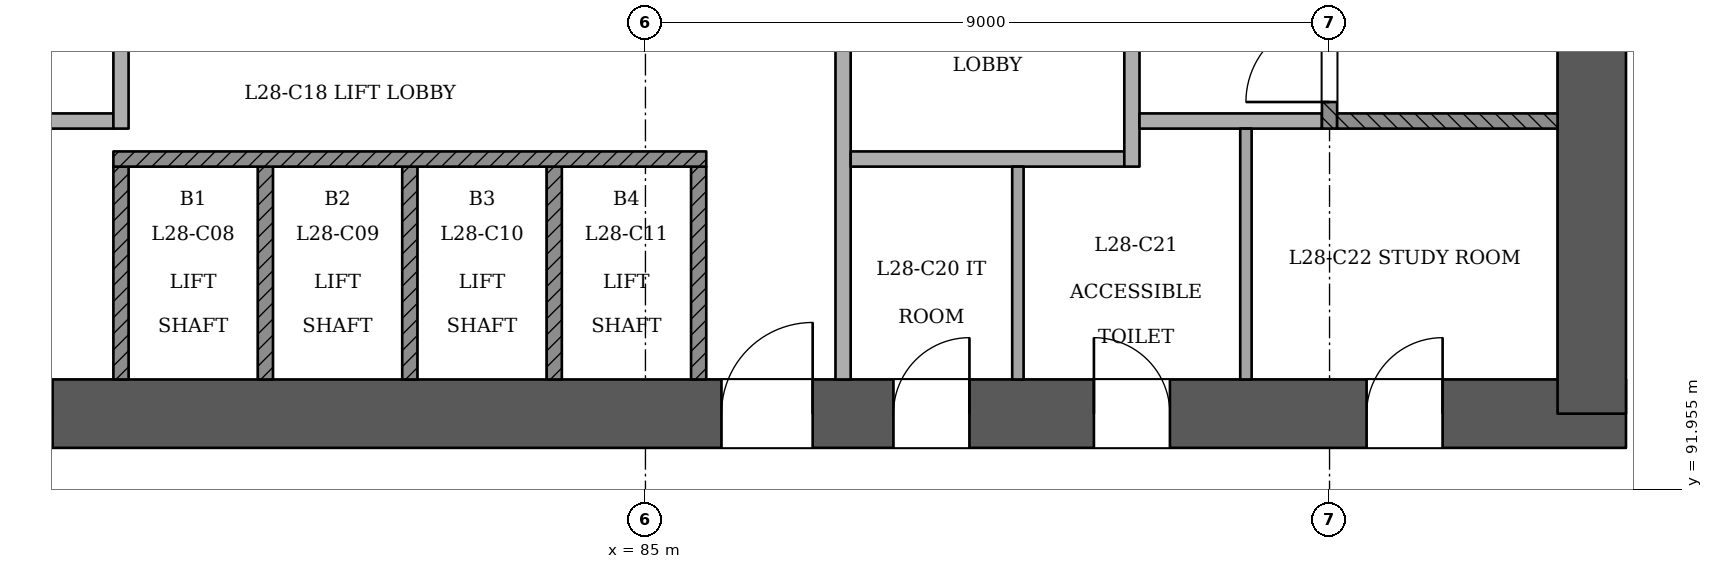
"""IFC4 building model, lengths in metres.
Left out: names, types, materials, properties, quantities, classifications, styles, units other than length and angle.
Written with IfcOpenShell. Run it as: python <this file> out.ifc"""

import sys

from ifc_helpers import new_model, si_unit, direction, frame, frame_2d, origin, place, context, subcontext, project, spatial, rectangle, extrude, element, fill, save


model = new_model("IFC4")
c1 = context("Model", 3, precision=1e-05, world=origin(), true_north=direction((0.0, 1.0)))
c2 = subcontext(c1, "Body", "Model", "MODEL_VIEW")
j1 = project(units=[si_unit("LENGTHUNIT", "METRE"), si_unit("PLANEANGLEUNIT", "RADIAN")], contexts=[c1])
p1 = place(None, origin())
s1 = spatial("IfcSite", under=j1, at=p1, CompositionType="ELEMENT")
p2 = place(p1, origin())
s2 = spatial("IfcBuilding", under=s1, at=p2, CompositionType="ELEMENT")
p3 = place(p2, frame((0.0, 0.0, 111.6)))
s3 = spatial("IfcBuildingStorey", under=s2, at=p3, CompositionType="ELEMENT", Elevation=111.6)
p4 = place(p3, frame((72.55, 92.95, 0.0), z_axis=(0.0, 0.0, 1.0), x_axis=(1.0, 0.0, 0.0)))
e1 = element("IfcWall", 1, at=p4, inside=s3, PredefinedType="SHEAR", context=c2, shape_type="SweptSolid", body=[
    extrude(rectangle(XDim=25.35, YDim=0.9, at=frame_2d((12.675, 0.0))), origin(), (0.0, 0.0, 1.0), 3.6),
])
p5 = place(p4, frame((1.25, 0.0, 0.0)))
e2 = element("IfcOpeningElement", 2, at=p5, cuts=e1, PredefinedType="OPENING", context=c2, shape_type="SweptSolid", body=[
    extrude(rectangle(XDim=1.2, YDim=2.1, at=frame_2d((0.6, 1.05))), frame((0.0, 0.46, 0.0), z_axis=(0.0, -1.0, 0.0), x_axis=(1.0, 0.0, 0.0)), (0.0, 0.0, 1.0), 0.921),
])
p6 = place(p4, frame((3.45, 0.0, 0.0)))
e3 = element("IfcOpeningElement", 3, at=p6, cuts=e1, PredefinedType="OPENING", context=c2, shape_type="SweptSolid", body=[
    extrude(rectangle(XDim=1.2, YDim=2.1, at=frame_2d((0.6, 1.05))), frame((0.0, 0.46, 0.0), z_axis=(0.0, -1.0, 0.0), x_axis=(1.0, 0.0, 0.0)), (0.0, 0.0, 1.0), 0.921),
])
p7 = place(p4, frame((13.45, 0.0, 0.0)))
e4 = element("IfcOpeningElement", 4, at=p7, cuts=e1, PredefinedType="OPENING", context=c2, shape_type="SweptSolid", body=[
    extrude(rectangle(XDim=1.2, YDim=2.1, at=frame_2d((0.6, 1.05))), frame((0.0, 0.46, 0.0), z_axis=(0.0, -1.0, 0.0), x_axis=(1.0, 0.0, 0.0)), (0.0, 0.0, 1.0), 0.921),
])
p8 = place(p4, frame((15.712, 0.0, 0.0)))
e5 = element("IfcOpeningElement", 5, at=p8, cuts=e1, PredefinedType="OPENING", context=c2, shape_type="SweptSolid", body=[
    extrude(rectangle(XDim=1.0, YDim=2.1, at=frame_2d((0.5, 1.05))), frame((0.0, 0.46, 0.0), z_axis=(0.0, -1.0, 0.0), x_axis=(1.0, 0.0, 0.0)), (0.0, 0.0, 1.0), 0.921),
])
p9 = place(p4, frame((18.35, 0.0, 0.0)))
e6 = element("IfcOpeningElement", 6, at=p9, cuts=e1, PredefinedType="OPENING", context=c2, shape_type="SweptSolid", body=[
    extrude(rectangle(XDim=1.0, YDim=2.1, at=frame_2d((0.5, 1.05))), frame((0.0, 0.46, 0.0), z_axis=(0.0, -1.0, 0.0), x_axis=(1.0, 0.0, 0.0)), (0.0, 0.0, 1.0), 0.921),
])
p10 = place(p4, frame((21.938, 0.0, 0.0)))
e7 = element("IfcOpeningElement", 7, at=p10, cuts=e1, PredefinedType="OPENING", context=c2, shape_type="SweptSolid", body=[
    extrude(rectangle(XDim=1.0, YDim=2.1, at=frame_2d((0.5, 1.05))), frame((0.0, 0.46, 0.0), z_axis=(0.0, -1.0, 0.0), x_axis=(1.0, 0.0, 0.0)), (0.0, 0.0, 1.0), 0.921),
])
p11 = place(p3, frame((97.45, 92.95, 0.0), z_axis=(0.0, 0.0, 1.0), x_axis=(0.0, 1.0, 0.0)))
e8 = element("IfcWall", 8, at=p11, inside=s3, PredefinedType="SHEAR", context=c2, shape_type="SweptSolid", body=[
    extrude(rectangle(XDim=11.35, YDim=0.9, at=frame_2d((5.675, 0.0))), origin(), (0.0, 0.0, 1.0), 3.6),
])
p12 = place(p3, frame((63.988, 97.906, 0.0), z_axis=(0.0, 0.0, 1.0), x_axis=(0.500001579174, -0.866024492046, 0.0)))
e9 = element("IfcWall", 9, at=p12, inside=s3, PredefinedType="PARTITIONING", context=c2, shape_type="SweptSolid", body=[
    extrude(rectangle(XDim=41.339, YDim=0.15, at=frame_2d((20.669, 0.0))), origin(), (0.0, 0.0, 1.0), 2.7),
])
p13 = place(p12, frame((0.228, 0.0, 0.0)))
e10 = element("IfcOpeningElement", 10, at=p13, cuts=e9, PredefinedType="OPENING", context=c2, shape_type="SweptSolid", body=[
    extrude(rectangle(XDim=1.2, YDim=2.1, at=frame_2d((0.6, 1.05))), frame((0.0, 0.085, 0.0), z_axis=(0.0, -1.0, 0.0), x_axis=(1.0, 0.0, 0.0)), (0.0, 0.0, 1.0), 0.171),
])
p14 = place(p12, frame((11.07, 0.0, 0.0)))
e11 = element("IfcOpeningElement", 11, at=p14, cuts=e9, PredefinedType="OPENING", context=c2, shape_type="SweptSolid", body=[
    extrude(rectangle(XDim=1.2, YDim=2.1, at=frame_2d((0.6, 1.05))), frame((0.0, 0.085, 0.0), z_axis=(0.0, -1.0, 0.0), x_axis=(1.0, 0.0, 0.0)), (0.0, 0.0, 1.0), 0.171),
])
p15 = place(p12, frame((22.32, 0.0, 0.0)))
e12 = element("IfcOpeningElement", 12, at=p15, cuts=e9, PredefinedType="OPENING", context=c2, shape_type="SweptSolid", body=[
    extrude(rectangle(XDim=1.2, YDim=2.1, at=frame_2d((0.6, 1.05))), frame((0.0, 0.085, 0.0), z_axis=(0.0, -1.0, 0.0), x_axis=(1.0, 0.0, 0.0)), (0.0, 0.0, 1.0), 0.171),
])
p16 = place(p12, frame((32.47, 0.0, 0.0)))
e13 = element("IfcOpeningElement", 13, at=p16, cuts=e9, PredefinedType="OPENING", context=c2, shape_type="SweptSolid", body=[
    extrude(rectangle(XDim=1.2, YDim=2.1, at=frame_2d((0.6, 1.05))), frame((0.0, 0.085, 0.0), z_axis=(0.0, -1.0, 0.0), x_axis=(1.0, 0.0, 0.0)), (0.0, 0.0, 1.0), 0.171),
])
p17 = place(p12, frame((39.758, 0.0, 0.0)))
e14 = element("IfcOpeningElement", 14, at=p17, cuts=e9, PredefinedType="OPENING", context=c2, shape_type="SweptSolid", body=[
    extrude(rectangle(XDim=1.0, YDim=2.1, at=frame_2d((0.5, 1.05))), frame((0.0, 0.085, 0.0), z_axis=(0.0, -1.0, 0.0), x_axis=(1.0, 0.0, 0.0)), (0.0, 0.0, 1.0), 0.171),
])
p18 = place(p3, frame((85.343, 62.105, 0.0), z_axis=(0.0, 0.0, 1.0), x_axis=(0.500001579174, 0.866024492046, 0.0)))
e15 = element("IfcWall", 15, at=p18, inside=s3, PredefinedType="PARTITIONING", context=c2, shape_type="SweptSolid", body=[
    extrude(rectangle(XDim=41.339, YDim=0.15, at=frame_2d((20.669, 0.0))), origin(), (0.0, 0.0, 1.0), 2.7),
])
p19 = place(p18, frame((0.312, 0.0, 0.0)))
e16 = element("IfcOpeningElement", 16, at=p19, cuts=e15, PredefinedType="OPENING", context=c2, shape_type="SweptSolid", body=[
    extrude(rectangle(XDim=1.2, YDim=2.1, at=frame_2d((0.6, 1.05))), frame((0.0, 0.085, 0.0), z_axis=(0.0, -1.0, 0.0), x_axis=(1.0, 0.0, 0.0)), (0.0, 0.0, 1.0), 0.171),
])
p20 = place(p18, frame((8.82, 0.0, 0.0)))
e17 = element("IfcOpeningElement", 17, at=p20, cuts=e15, PredefinedType="OPENING", context=c2, shape_type="SweptSolid", body=[
    extrude(rectangle(XDim=1.2, YDim=2.1, at=frame_2d((0.6, 1.05))), frame((0.0, 0.085, 0.0), z_axis=(0.0, -1.0, 0.0), x_axis=(1.0, 0.0, 0.0)), (0.0, 0.0, 1.0), 0.171),
])
p21 = place(p18, frame((22.32, 0.0, 0.0)))
e18 = element("IfcOpeningElement", 18, at=p21, cuts=e15, PredefinedType="OPENING", context=c2, shape_type="SweptSolid", body=[
    extrude(rectangle(XDim=1.2, YDim=2.1, at=frame_2d((0.6, 1.05))), frame((0.0, 0.085, 0.0), z_axis=(0.0, -1.0, 0.0), x_axis=(1.0, 0.0, 0.0)), (0.0, 0.0, 1.0), 0.171),
])
p22 = place(p18, frame((32.47, 0.0, 0.0)))
e19 = element("IfcOpeningElement", 19, at=p22, cuts=e15, PredefinedType="OPENING", context=c2, shape_type="SweptSolid", body=[
    extrude(rectangle(XDim=1.2, YDim=2.1, at=frame_2d((0.6, 1.05))), frame((0.0, 0.085, 0.0), z_axis=(0.0, -1.0, 0.0), x_axis=(1.0, 0.0, 0.0)), (0.0, 0.0, 1.0), 0.171),
])
p23 = place(p18, frame((39.739, 0.0, 0.0)))
e20 = element("IfcOpeningElement", 20, at=p23, cuts=e15, PredefinedType="OPENING", context=c2, shape_type="SweptSolid", body=[
    extrude(rectangle(XDim=1.0, YDim=2.1, at=frame_2d((0.5, 1.05))), frame((0.0, 0.085, 0.0), z_axis=(0.0, -1.0, 0.0), x_axis=(1.0, 0.0, 0.0)), (0.0, 0.0, 1.0), 0.171),
])
for number, where, z_axis, x_axis in (
    (21, (78.1, 93.4, 0.0), (0.0, 0.0, 1.0), (0.0, 1.0, 0.0)),
    (22, (80.0, 93.4, 0.0), (0.0, 0.0, 1.0), (0.0, 1.0, 0.0)),
    (23, (81.9, 93.4, 0.0), (0.0, 0.0, 1.0), (0.0, 1.0, 0.0)),
    (24, (83.8, 93.4, 0.0), (0.0, 0.0, 1.0), (0.0, 1.0, 0.0)),
    (25, (85.7, 93.4, 0.0), (0.0, 0.0, 1.0), (0.0, 1.0, 0.0)),
):
    element("IfcWall", number, at=place(p3, frame(where, z_axis=z_axis, x_axis=x_axis)), inside=s3, PredefinedType="SOLIDWALL", context=c2, shape_type="SweptSolid", body=[
        extrude(rectangle(XDim=2.8, YDim=0.2, at=frame_2d((1.4, 0.0))), origin(), (0.0, 0.0, 1.0), 3.1),
    ])
p24 = place(p3, frame((87.6, 93.4, 0.0), z_axis=(0.0, 0.0, 1.0), x_axis=(0.0, 1.0, 0.0)))
e26 = element("IfcWall", 26, at=p24, inside=s3, PredefinedType="PARTITIONING", context=c2, shape_type="SweptSolid", body=[
    extrude(rectangle(XDim=7.0, YDim=0.2, at=frame_2d((3.5, 0.0))), origin(), (0.0, 0.0, 1.0), 3.1),
])
p25 = place(p24, frame((4.45, 0.0, 0.0)))
e27 = element("IfcOpeningElement", 27, at=p25, cuts=e26, PredefinedType="OPENING", context=c2, shape_type="SweptSolid", body=[
    extrude(rectangle(XDim=1.1, YDim=2.1, at=frame_2d((0.55, 1.05))), frame((0.0, 0.11, 0.0), z_axis=(0.0, -1.0, 0.0), x_axis=(1.0, 0.0, 0.0)), (0.0, 0.0, 1.0), 0.221),
])
p26 = place(p3, frame((89.9, 93.4, 0.0), z_axis=(0.0, 0.0, 1.0), x_axis=(0.0, 1.0, 0.0)))
e28 = element("IfcWall", 28, at=p26, inside=s3, PredefinedType="PARTITIONING", context=c2, shape_type="SweptSolid", body=[
    extrude(rectangle(XDim=2.8, YDim=0.15, at=frame_2d((1.4, 0.0))), origin(), (0.0, 0.0, 1.0), 3.1),
])
p27 = place(p3, frame((92.9, 93.4, 0.0), z_axis=(0.0, 0.0, 1.0), x_axis=(0.0, 1.0, 0.0)))
e29 = element("IfcWall", 29, at=p27, inside=s3, PredefinedType="PARTITIONING", context=c2, shape_type="SweptSolid", body=[
    extrude(rectangle(XDim=3.3, YDim=0.15, at=frame_2d((1.65, 0.0))), origin(), (0.0, 0.0, 1.0), 3.1),
])
p28 = place(p3, frame((78.0, 96.3, 0.0), z_axis=(0.0, 0.0, 1.0), x_axis=(1.0, 0.0, 0.0)))
e30 = element("IfcWall", 30, at=p28, inside=s3, PredefinedType="SOLIDWALL", context=c2, shape_type="SweptSolid", body=[
    extrude(rectangle(XDim=7.8, YDim=0.2, at=frame_2d((3.9, 0.0))), origin(), (0.0, 0.0, 1.0), 3.1),
])
p29 = place(p3, frame((87.7, 96.3, 0.0), z_axis=(0.0, 0.0, 1.0), x_axis=(1.0, 0.0, 0.0)))
e31 = element("IfcWall", 31, at=p29, inside=s3, PredefinedType="PARTITIONING", context=c2, shape_type="SweptSolid", body=[
    extrude(rectangle(XDim=3.6, YDim=0.2, at=frame_2d((1.8, 0.0))), origin(), (0.0, 0.0, 1.0), 3.1),
])
p30 = place(p3, frame((91.4, 96.2, 0.0), z_axis=(0.0, 0.0, 1.0), x_axis=(0.0, 1.0, 0.0)))
e32 = element("IfcWall", 32, at=p30, inside=s3, PredefinedType="PARTITIONING", context=c2, shape_type="SweptSolid", body=[
    extrude(rectangle(XDim=4.2, YDim=0.2, at=frame_2d((2.1, 0.0))), origin(), (0.0, 0.0, 1.0), 3.1),
])
p31 = place(p30, frame((2.45, 0.0, 0.0)))
e33 = element("IfcOpeningElement", 33, at=p31, cuts=e32, PredefinedType="OPENING", context=c2, shape_type="SweptSolid", body=[
    extrude(rectangle(XDim=1.1, YDim=2.1, at=frame_2d((0.55, 1.05))), frame((0.0, 0.11, 0.0), z_axis=(0.0, -1.0, 0.0), x_axis=(1.0, 0.0, 0.0)), (0.0, 0.0, 1.0), 0.221),
])
p32 = place(p3, frame((76.1, 96.8, 0.0), z_axis=(0.0, 0.0, 1.0), x_axis=(1.0, 0.0, 0.0)))
e34 = element("IfcWall", 34, at=p32, inside=s3, PredefinedType="PARTITIONING", context=c2, shape_type="SweptSolid", body=[
    extrude(rectangle(XDim=1.9, YDim=0.2, at=frame_2d((0.95, 0.0))), origin(), (0.0, 0.0, 1.0), 3.1),
])
p33 = place(p3, frame((78.1, 96.7, 0.0), z_axis=(0.0, 0.0, 1.0), x_axis=(0.0, 1.0, 0.0)))
e35 = element("IfcWall", 35, at=p33, inside=s3, PredefinedType="PARTITIONING", context=c2, shape_type="SweptSolid", body=[
    extrude(rectangle(XDim=3.7, YDim=0.2, at=frame_2d((1.85, 0.0))), origin(), (0.0, 0.0, 1.0), 3.1),
])
p34 = place(p33, frame((1.95, 0.0, 0.0)))
e36 = element("IfcOpeningElement", 36, at=p34, cuts=e35, PredefinedType="OPENING", context=c2, shape_type="SweptSolid", body=[
    extrude(rectangle(XDim=1.1, YDim=2.1, at=frame_2d((0.55, 1.05))), frame((0.0, 0.11, 0.0), z_axis=(0.0, -1.0, 0.0), x_axis=(1.0, 0.0, 0.0)), (0.0, 0.0, 1.0), 0.221),
])
p35 = place(p3, frame((91.5, 96.8, 0.0), z_axis=(0.0, 0.0, 1.0), x_axis=(1.0, 0.0, 0.0)))
e37 = element("IfcWall", 37, at=p35, inside=s3, PredefinedType="PARTITIONING", context=c2, shape_type="SweptSolid", body=[
    extrude(rectangle(XDim=2.4, YDim=0.2, at=frame_2d((1.2, 0.0))), origin(), (0.0, 0.0, 1.0), 3.1),
])
p36 = place(p3, frame((94.0, 96.7, 0.0), z_axis=(0.0, 0.0, 1.0), x_axis=(0.0, 1.0, 0.0)))
e38 = element("IfcWall", 38, at=p36, inside=s3, PredefinedType="SOLIDWALL", context=c2, shape_type="SweptSolid", body=[
    extrude(rectangle(XDim=3.7, YDim=0.2, at=frame_2d((1.85, 0.0))), origin(), (0.0, 0.0, 1.0), 3.1),
])
p37 = place(p36, frame((0.35, 0.0, 0.0)))
e39 = element("IfcOpeningElement", 39, at=p37, cuts=e38, PredefinedType="OPENING", context=c2, shape_type="SweptSolid", body=[
    extrude(rectangle(XDim=1.1, YDim=2.1, at=frame_2d((0.55, 1.05))), frame((0.0, 0.11, 0.0), z_axis=(0.0, -1.0, 0.0), x_axis=(1.0, 0.0, 0.0)), (0.0, 0.0, 1.0), 0.221),
])
p38 = place(p3, frame((94.1, 96.8, 0.0), z_axis=(0.0, 0.0, 1.0), x_axis=(1.0, 0.0, 0.0)))
e40 = element("IfcWall", 40, at=p38, inside=s3, PredefinedType="SOLIDWALL", context=c2, shape_type="SweptSolid", body=[
    extrude(rectangle(XDim=2.9, YDim=0.2, at=frame_2d((1.45, 0.0))), origin(), (0.0, 0.0, 1.0), 3.1),
])
p39 = place(p37, origin())
e41 = element("IfcDoor", 41, at=p39, inside=s3, OperationType="SINGLE_SWING_LEFT", PredefinedType="NOTDEFINED", context=c2, shape_type="SweptSolid", body=[
    extrude(rectangle(XDim=1.1, YDim=2.1, at=frame_2d((0.55, 1.05))), frame((0.0, 0.025, 0.0), z_axis=(0.0, -1.0, 0.0), x_axis=(1.0, 0.0, 0.0)), (0.0, 0.0, 1.0), 0.05),
])
fill(e39, e41)
p40 = place(p6, origin())
e42 = element("IfcDoor", 42, at=p40, inside=s3, OperationType="SINGLE_SWING_LEFT", PredefinedType="NOTDEFINED", context=c2, shape_type="SweptSolid", body=[
    extrude(rectangle(XDim=1.2, YDim=2.1, at=frame_2d((0.6, 1.05))), frame((0.0, 0.025, 0.0), z_axis=(0.0, -1.0, 0.0), x_axis=(1.0, 0.0, 0.0)), (0.0, 0.0, 1.0), 0.05),
])
fill(e3, e42)
p41 = place(p7, origin())
e43 = element("IfcDoor", 43, at=p41, inside=s3, OperationType="SINGLE_SWING_RIGHT", PredefinedType="NOTDEFINED", context=c2, shape_type="SweptSolid", body=[
    extrude(rectangle(XDim=1.2, YDim=2.1, at=frame_2d((0.6, 1.05))), frame((0.0, 0.025, 0.0), z_axis=(0.0, -1.0, 0.0), x_axis=(1.0, 0.0, 0.0)), (0.0, 0.0, 1.0), 0.05),
])
fill(e4, e43)
p42 = place(p8, origin())
e44 = element("IfcDoor", 44, at=p42, inside=s3, OperationType="SINGLE_SWING_RIGHT", PredefinedType="NOTDEFINED", context=c2, shape_type="SweptSolid", body=[
    extrude(rectangle(XDim=1.0, YDim=2.1, at=frame_2d((0.5, 1.05))), frame((0.0, 0.025, 0.0), z_axis=(0.0, -1.0, 0.0), x_axis=(1.0, 0.0, 0.0)), (0.0, 0.0, 1.0), 0.05),
])
fill(e5, e44)
p43 = place(p9, origin())
e45 = element("IfcDoor", 45, at=p43, inside=s3, OperationType="SINGLE_SWING_LEFT", PredefinedType="NOTDEFINED", context=c2, shape_type="SweptSolid", body=[
    extrude(rectangle(XDim=1.0, YDim=2.1, at=frame_2d((0.5, 1.05))), frame((0.0, 0.025, 0.0), z_axis=(0.0, -1.0, 0.0), x_axis=(1.0, 0.0, 0.0)), (0.0, 0.0, 1.0), 0.05),
])
fill(e6, e45)
p44 = place(p10, origin())
e46 = element("IfcDoor", 46, at=p44, inside=s3, OperationType="SINGLE_SWING_RIGHT", PredefinedType="NOTDEFINED", context=c2, shape_type="SweptSolid", body=[
    extrude(rectangle(XDim=1.0, YDim=2.1, at=frame_2d((0.5, 1.05))), frame((0.0, 0.025, 0.0), z_axis=(0.0, -1.0, 0.0), x_axis=(1.0, 0.0, 0.0)), (0.0, 0.0, 1.0), 0.05),
])
fill(e7, e46)
save(model, sys.argv[1])
